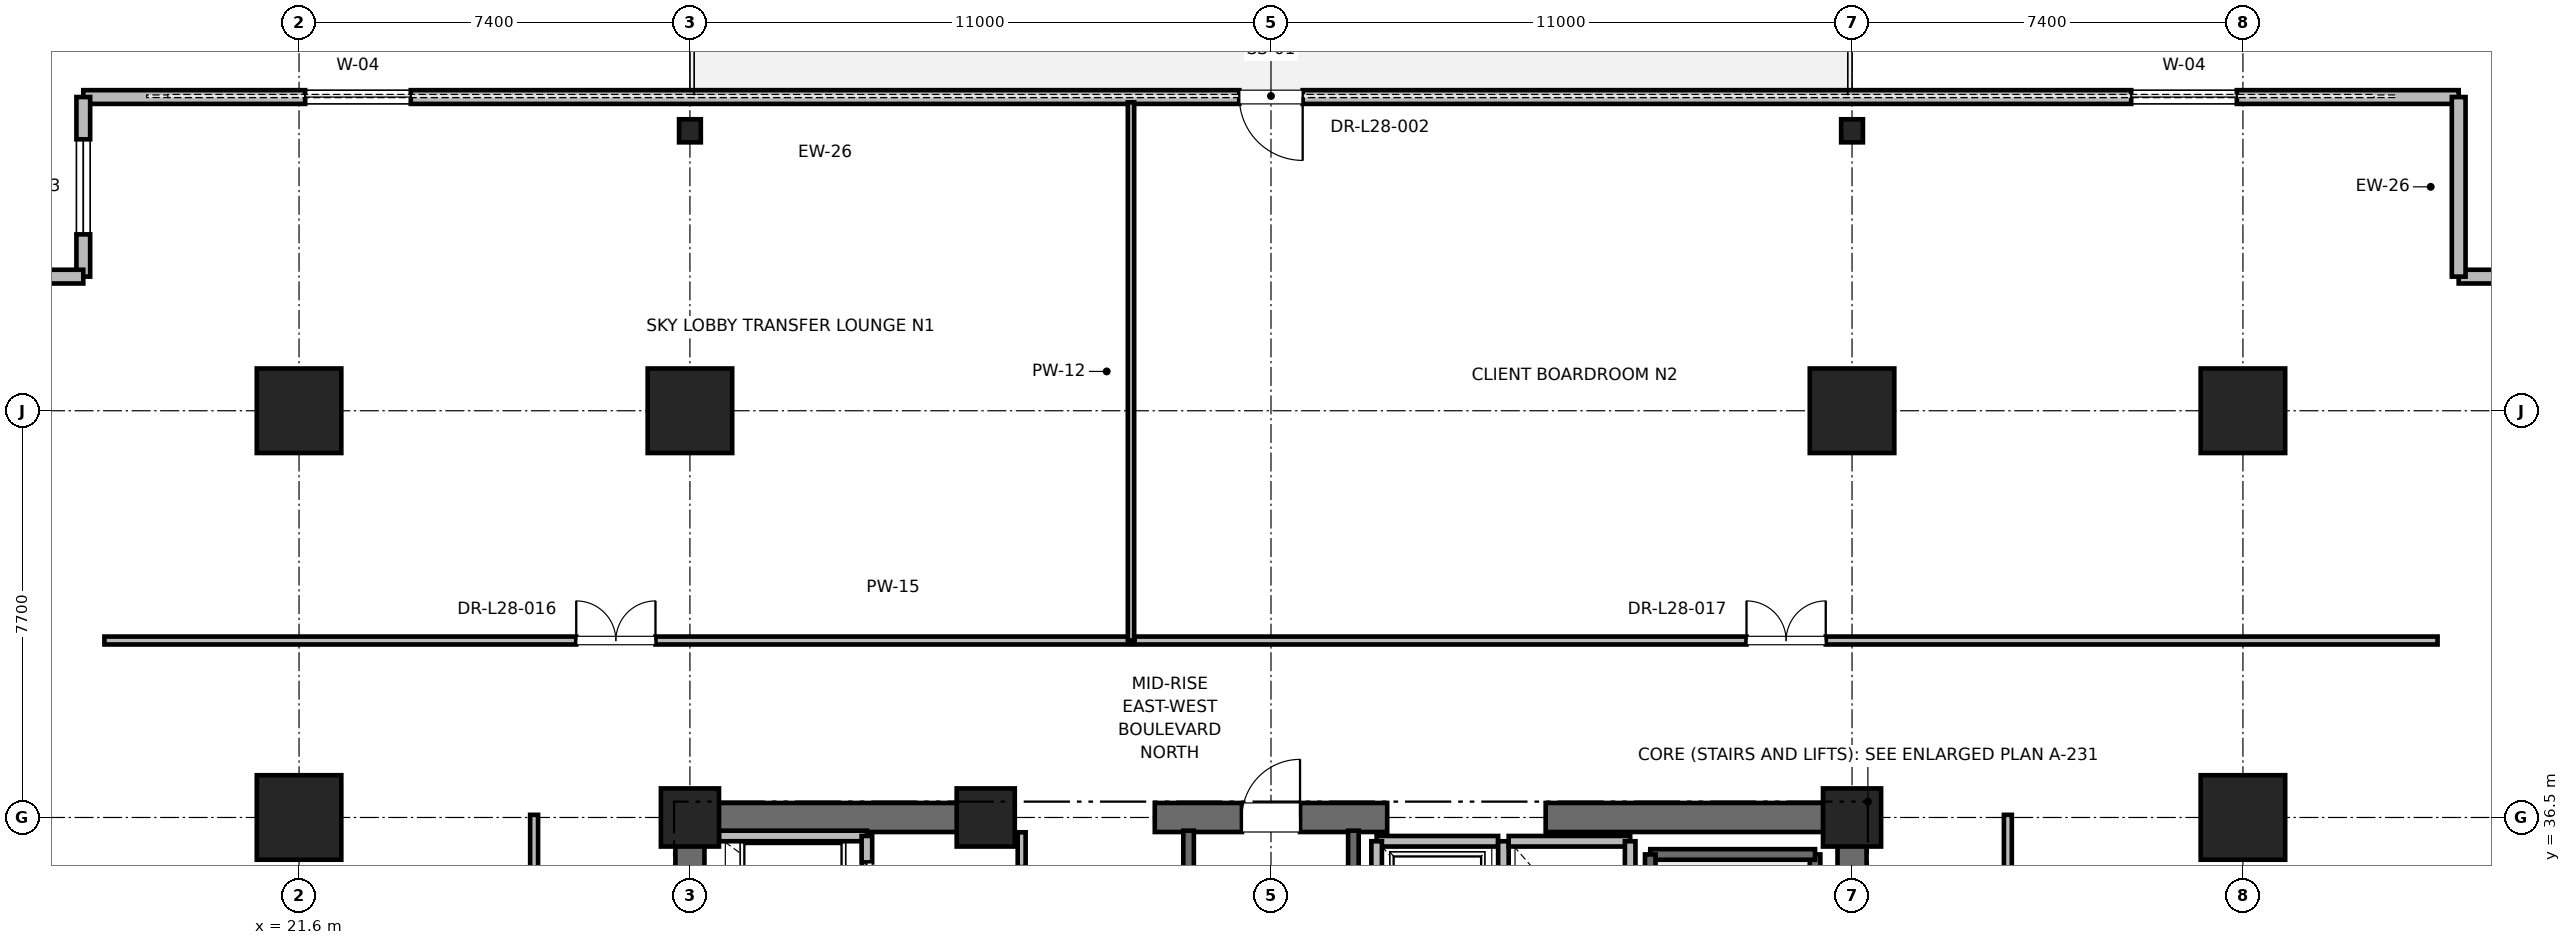
"""IFC4 building model, lengths in metres.
Left out: names, types, materials, properties, quantities, classifications, styles, units other than length and angle.
Written with IfcOpenShell. Run it as: python <this file> out.ifc"""

import sys

from ifc_helpers import new_model, si_unit, direction, frame, frame_2d, origin, origin_2d, place, context, subcontext, project, spatial, rectangle, i_section, extrude, element, fill, save


model = new_model("IFC4")
c1 = context("Model", 3, precision=1e-05, world=origin(), true_north=direction((0.0, 1.0)))
c2 = subcontext(c1, "Body", "Model", "MODEL_VIEW")
j1 = project(units=[si_unit("LENGTHUNIT", "METRE"), si_unit("PLANEANGLEUNIT", "RADIAN")], contexts=[c1])
p1 = place(None, origin())
s1 = spatial("IfcSite", under=j1, at=p1, CompositionType="ELEMENT")
p2 = place(p1, origin())
s2 = spatial("IfcBuilding", under=s1, at=p2, CompositionType="ELEMENT")
p3 = place(p2, frame((0.0, 0.0, 123.4)))
s3 = spatial("IfcBuildingStorey", under=s2, at=p3, CompositionType="ELEMENT", Elevation=123.4)
for number, where, z_axis, x_axis in (
    (1, (29.0, 44.2, 0.0), (0.0, 0.0, 1.0), (1.0, 0.0, 0.0)),
    (2, (51.0, 44.2, 0.0), (0.0, 0.0, 1.0), (1.0, 0.0, 0.0)),
    (3, (21.6, 36.5, 0.0), (0.0, 0.0, 1.0), (1.0, 0.0, 0.0)),
    (4, (58.4, 36.5, 0.0), (0.0, 0.0, 1.0), (1.0, 0.0, 0.0)),
    (5, (21.6, 44.2, 0.0), (0.0, 0.0, 1.0), (1.0, 0.0, 0.0)),
    (6, (58.4, 44.2, 0.0), (0.0, 0.0, 1.0), (1.0, 0.0, 0.0)),
):
    element("IfcColumn", number, at=place(p3, frame(where, z_axis=z_axis, x_axis=x_axis)), inside=s3, PredefinedType="COLUMN", context=c2, shape_type="SweptSolid", body=[
        extrude(rectangle(XDim=1.6, YDim=1.6, at=origin_2d()), origin(), (0.0, 0.0, 1.0), 5.0),
    ])
for number, where, z_axis, x_axis in (
    (7, (29.0, 49.5, 0.0), (0.0, 0.0, 1.0), (1.0, 0.0, 0.0)),
    (8, (51.0, 49.5, 0.0), (0.0, 0.0, 1.0), (1.0, 0.0, 0.0)),
):
    element("IfcColumn", number, at=place(p3, frame(where, z_axis=z_axis, x_axis=x_axis)), inside=s3, PredefinedType="COLUMN", context=c2, shape_type="SweptSolid", body=[
        extrude(i_section(OverallWidth=0.412, OverallDepth=0.437, WebThickness=0.036, FlangeThickness=0.058, FilletRadius=0.015, at=origin_2d()), origin(), (0.0, 0.0, 1.0), 5.0),
    ])
for number, where, z_axis, x_axis in (
    (9, (29.0, 36.5, 0.0), (0.0, 0.0, 1.0), (1.0, 0.0, 0.0)),
    (10, (51.0, 36.5, 0.0), (0.0, 0.0, 1.0), (1.0, 0.0, 0.0)),
    (11, (34.6, 36.5, 0.0), (0.0, 0.0, 1.0), (1.0, 0.0, 0.0)),
):
    element("IfcColumn", number, at=place(p3, frame(where, z_axis=z_axis, x_axis=x_axis)), inside=s3, PredefinedType="PILASTER", context=c2, shape_type="SweptSolid", body=[
        extrude(rectangle(XDim=1.1, YDim=1.1, at=origin_2d()), origin(), (0.0, 0.0, 1.0), 5.0),
    ])
p4 = place(p3, frame((29.0, 36.5, 0.0), z_axis=(0.0, 0.0, 1.0), x_axis=(1.0, 0.0, 0.0)))
e12 = element("IfcWall", 12, at=p4, inside=s3, PredefinedType="SHEAR", context=c2, shape_type="SweptSolid", body=[
    extrude(rectangle(XDim=5.8, YDim=0.55, at=frame_2d((2.9, 0.0))), origin(), (0.0, 0.0, 1.0), 4.775),
])
p5 = place(p3, frame((37.8, 36.5, 0.0), z_axis=(0.0, 0.0, 1.0), x_axis=(1.0, 0.0, 0.0)))
e13 = element("IfcWall", 13, at=p5, inside=s3, PredefinedType="SHEAR", context=c2, shape_type="SweptSolid", body=[
    extrude(rectangle(XDim=4.4, YDim=0.55, at=frame_2d((2.2, 0.0))), origin(), (0.0, 0.0, 1.0), 4.775),
])
p6 = place(p5, frame((1.65, 0.0, 0.0)))
e14 = element("IfcOpeningElement", 14, at=p6, cuts=e13, PredefinedType="OPENING", context=c2, shape_type="SweptSolid", body=[
    extrude(rectangle(XDim=1.1, YDim=2.15, at=frame_2d((0.55, 1.075))), frame((0.0, 0.275, 0.0), z_axis=(0.0, -1.0, 0.0), x_axis=(1.0, 0.0, 0.0)), (0.0, 0.0, 1.0), 0.55),
])
for number, where, z_axis, x_axis in (
    (15, (45.2, 36.5, 0.0), (0.0, 0.0, 1.0), (1.0, 0.0, 0.0)),
    (16, (29.0, 30.7, 0.0), (0.0, 0.0, 1.0), (0.0, 1.0, 0.0)),
):
    element("IfcWall", number, at=place(p3, frame(where, z_axis=z_axis, x_axis=x_axis)), inside=s3, PredefinedType="SHEAR", context=c2, shape_type="SweptSolid", body=[
        extrude(rectangle(XDim=5.8, YDim=0.55, at=frame_2d((2.9, 0.0))), origin(), (0.0, 0.0, 1.0), 4.775),
    ])
p7 = place(p3, frame((51.0, 27.7, 0.0), z_axis=(0.0, 0.0, 1.0), x_axis=(0.0, 1.0, 0.0)))
e17 = element("IfcWall", 17, at=p7, inside=s3, PredefinedType="SHEAR", context=c2, shape_type="SweptSolid", body=[
    extrude(rectangle(XDim=8.8, YDim=0.55, at=frame_2d((4.4, 0.0))), origin(), (0.0, 0.0, 1.0), 4.775),
])
p8 = place(p3, frame((62.485, 50.139, 0.0), z_axis=(0.0, 0.0, 1.0), x_axis=(-1.0, 0.0, 0.0)))
e18 = element("IfcWall", 18, at=p8, inside=s3, PredefinedType="PARAPET", context=c2, shape_type="SweptSolid", body=[
    extrude(rectangle(XDim=44.969, YDim=0.26, at=frame_2d((22.485, 0.0))), origin(), (0.0, 0.0, 1.0), 4.273),
])
p9 = place(p8, frame((4.2, 0.0, 0.85)))
e19 = element("IfcOpeningElement", 19, at=p9, cuts=e18, PredefinedType="OPENING", context=c2, shape_type="SweptSolid", body=[
    extrude(rectangle(XDim=2.0, YDim=2.3, at=frame_2d((1.0, 1.15))), frame((0.0, 0.13, 0.0), z_axis=(0.0, -1.0, 0.0), x_axis=(1.0, 0.0, 0.0)), (0.0, 0.0, 1.0), 0.26),
])
p10 = place(p8, frame((21.885, 0.0, 0.0)))
e20 = element("IfcOpeningElement", 20, at=p10, cuts=e18, PredefinedType="OPENING", context=c2, shape_type="SweptSolid", body=[
    extrude(rectangle(XDim=1.2, YDim=2.2, at=frame_2d((0.6, 1.1))), frame((0.0, 0.13, 0.0), z_axis=(0.0, -1.0, 0.0), x_axis=(1.0, 0.0, 0.0)), (0.0, 0.0, 1.0), 0.26),
])
p11 = place(p8, frame((38.769, 0.0, 0.85)))
e21 = element("IfcOpeningElement", 21, at=p11, cuts=e18, PredefinedType="OPENING", context=c2, shape_type="SweptSolid", body=[
    extrude(rectangle(XDim=2.0, YDim=2.3, at=frame_2d((1.0, 1.15))), frame((0.0, 0.13, 0.0), z_axis=(0.0, -1.0, 0.0), x_axis=(1.0, 0.0, 0.0)), (0.0, 0.0, 1.0), 0.26),
])
p12 = place(p3, frame((66.285, 46.739, 0.0), z_axis=(0.0, 0.0, 1.0), x_axis=(-1.0, 0.0, 0.0)))
e22 = element("IfcWall", 22, at=p12, inside=s3, PredefinedType="PARAPET", context=c2, shape_type="SweptSolid", body=[
    extrude(rectangle(XDim=3.8, YDim=0.26, at=frame_2d((1.9, 0.0))), origin(), (0.0, 0.0, 1.0), 4.775),
])
p13 = place(p12, frame((1.0, 0.0, 0.85)))
e23 = element("IfcOpeningElement", 23, at=p13, cuts=e22, PredefinedType="OPENING", context=c2, shape_type="SweptSolid", body=[
    extrude(rectangle(XDim=1.8, YDim=2.2, at=frame_2d((0.9, 1.1))), frame((0.0, 0.13, 0.0), z_axis=(0.0, -1.0, 0.0), x_axis=(1.0, 0.0, 0.0)), (0.0, 0.0, 1.0), 0.26),
])
p14 = place(p3, frame((62.485, 46.739, 0.0), z_axis=(0.0, 0.0, 1.0), x_axis=(0.0, 1.0, 0.0)))
e24 = element("IfcWall", 24, at=p14, inside=s3, PredefinedType="PARAPET", context=c2, shape_type="SweptSolid", body=[
    extrude(rectangle(XDim=3.4, YDim=0.26, at=frame_2d((1.7, 0.0))), origin(), (0.0, 0.0, 1.0), 4.775),
])
p15 = place(p3, frame((17.515, 50.139, 0.0), z_axis=(0.0, 0.0, 1.0), x_axis=(0.0, -1.0, 0.0)))
e25 = element("IfcWall", 25, at=p15, inside=s3, PredefinedType="PARAPET", context=c2, shape_type="SweptSolid", body=[
    extrude(rectangle(XDim=3.4, YDim=0.26, at=frame_2d((1.7, 0.0))), origin(), (0.0, 0.0, 1.0), 4.775),
])
p16 = place(p15, frame((0.8, 0.0, 0.85)))
e26 = element("IfcOpeningElement", 26, at=p16, cuts=e25, PredefinedType="OPENING", context=c2, shape_type="SweptSolid", body=[
    extrude(rectangle(XDim=1.8, YDim=2.2, at=frame_2d((0.9, 1.1))), frame((0.0, 0.13, 0.0), z_axis=(0.0, -1.0, 0.0), x_axis=(1.0, 0.0, 0.0)), (0.0, 0.0, 1.0), 0.26),
])
p17 = place(p3, frame((17.515, 46.739, 0.0), z_axis=(0.0, 0.0, 1.0), x_axis=(-1.0, 0.0, 0.0)))
e27 = element("IfcWall", 27, at=p17, inside=s3, PredefinedType="PARAPET", context=c2, shape_type="SweptSolid", body=[
    extrude(rectangle(XDim=3.8, YDim=0.26, at=frame_2d((1.9, 0.0))), origin(), (0.0, 0.0, 1.0), 4.775),
])
p18 = place(p3, frame((50.3, 27.65, 0.0), z_axis=(0.0, 0.0, 1.0), x_axis=(0.0, 1.0, 0.0)))
e28 = element("IfcWall", 28, at=p18, inside=s3, PredefinedType="SOLIDWALL", context=c2, shape_type="SweptSolid", body=[
    extrude(rectangle(XDim=8.15, YDim=0.2, at=frame_2d((4.075, 0.0))), origin(), (0.0, 0.0, 1.0), 4.775),
])
p19 = place(p3, frame((47.18, 35.8, 0.0), z_axis=(0.0, 0.0, 1.0), x_axis=(1.0, 0.0, 0.0)))
e29 = element("IfcWall", 29, at=p19, inside=s3, PredefinedType="SOLIDWALL", context=c2, shape_type="SweptSolid", body=[
    extrude(rectangle(XDim=3.12, YDim=0.2, at=frame_2d((1.56, 0.0))), origin(), (0.0, 0.0, 1.0), 4.775),
])
p20 = place(p3, frame((47.18, 27.62, 0.0), z_axis=(0.0, 0.0, 1.0), x_axis=(0.0, 1.0, 0.0)))
e30 = element("IfcWall", 30, at=p20, inside=s3, PredefinedType="SOLIDWALL", context=c2, shape_type="SweptSolid", body=[
    extrude(rectangle(XDim=8.18, YDim=0.2, at=frame_2d((4.09, 0.0))), origin(), (0.0, 0.0, 1.0), 4.775),
])
p21 = place(p3, frame((38.44, 27.38, 0.0), z_axis=(0.0, 0.0, 1.0), x_axis=(0.0, 1.0, 0.0)))
e31 = element("IfcWall", 31, at=p21, inside=s3, PredefinedType="SOLIDWALL", context=c2, shape_type="SweptSolid", body=[
    extrude(rectangle(XDim=8.87, YDim=0.2, at=frame_2d((4.435, 0.0))), origin(), (0.0, 0.0, 1.0), 4.775),
])
p22 = place(p3, frame((41.56, 27.68, 0.0), z_axis=(0.0, 0.0, 1.0), x_axis=(0.0, 1.0, 0.0)))
e32 = element("IfcWall", 32, at=p22, inside=s3, PredefinedType="SOLIDWALL", context=c2, shape_type="SweptSolid", body=[
    extrude(rectangle(XDim=8.57, YDim=0.2, at=frame_2d((4.285, 0.0))), origin(), (0.0, 0.0, 1.0), 4.775),
])
p23 = place(p3, frame((32.35, 36.15, 0.0), z_axis=(0.0, 0.0, 1.0), x_axis=(-1.0, 0.0, 0.0)))
e33 = element("IfcWall", 33, at=p23, inside=s3, PredefinedType="SOLIDWALL", context=c2, shape_type="SweptSolid", body=[
    extrude(rectangle(XDim=2.8, YDim=0.2, at=frame_2d((1.4, 0.0))), origin(), (0.0, 0.0, 1.0), 3.985),
])
p24 = place(p3, frame((32.35, 34.05, 0.0), z_axis=(0.0, 0.0, 1.0), x_axis=(0.0, 1.0, 0.0)))
e34 = element("IfcWall", 34, at=p24, inside=s3, PredefinedType="SOLIDWALL", context=c2, shape_type="SweptSolid", body=[
    extrude(rectangle(XDim=2.1, YDim=0.2, at=frame_2d((1.05, 0.0))), origin(), (0.0, 0.0, 1.0), 4.775),
])
p25 = place(p24, frame((0.5, 0.0, 0.0)))
e35 = element("IfcOpeningElement", 35, at=p25, cuts=e34, PredefinedType="OPENING", context=c2, shape_type="SweptSolid", body=[
    extrude(rectangle(XDim=1.1, YDim=2.2, at=frame_2d((0.55, 1.1))), frame((0.0, 0.1, 0.0), z_axis=(0.0, -1.0, 0.0), x_axis=(1.0, 0.0, 0.0)), (0.0, 0.0, 1.0), 0.2),
])
p26 = place(p3, frame((44.3, 36.05, 0.0), z_axis=(0.0, 0.0, 1.0), x_axis=(-1.0, 0.0, 0.0)))
e36 = element("IfcWall", 36, at=p26, inside=s3, PredefinedType="SOLIDWALL", context=c2, shape_type="SweptSolid", body=[
    extrude(rectangle(XDim=2.3, YDim=0.2, at=frame_2d((1.15, 0.0))), origin(), (0.0, 0.0, 1.0), 3.755),
])
for number, where, z_axis, x_axis in (
    (37, (42.0, 36.05, 0.0), (0.0, 0.0, 1.0), (0.0, -1.0, 0.0)),
    (38, (44.4, 33.45, 0.0), (0.0, 0.0, 1.0), (0.0, 1.0, 0.0)),
):
    element("IfcWall", number, at=place(p3, frame(where, z_axis=z_axis, x_axis=x_axis)), inside=s3, PredefinedType="SOLIDWALL", context=c2, shape_type="SweptSolid", body=[
        extrude(rectangle(XDim=2.6, YDim=0.2, at=frame_2d((1.3, 0.0))), origin(), (0.0, 0.0, 1.0), 3.755),
    ])
p27 = place(p3, frame((46.8, 36.05, 0.0), z_axis=(0.0, 0.0, 1.0), x_axis=(-1.0, 0.0, 0.0)))
e39 = element("IfcWall", 39, at=p27, inside=s3, PredefinedType="SOLIDWALL", context=c2, shape_type="SweptSolid", body=[
    extrude(rectangle(XDim=2.3, YDim=0.2, at=frame_2d((1.15, 0.0))), origin(), (0.0, 0.0, 1.0), 3.755),
])
p28 = place(p3, frame((46.8, 33.45, 0.0), z_axis=(0.0, 0.0, 1.0), x_axis=(0.0, 1.0, 0.0)))
e40 = element("IfcWall", 40, at=p28, inside=s3, PredefinedType="SOLIDWALL", context=c2, shape_type="SweptSolid", body=[
    extrude(rectangle(XDim=2.6, YDim=0.2, at=frame_2d((1.3, 0.0))), origin(), (0.0, 0.0, 1.0), 4.775),
])
p29 = place(p3, frame((35.28, 33.95, 0.0), z_axis=(0.0, 0.0, 1.0), x_axis=(0.0, 1.0, 0.0)))
e41 = element("IfcWall", 41, at=p29, inside=s3, PredefinedType="PARTITIONING", context=c2, shape_type="SweptSolid", body=[
    extrude(rectangle(XDim=2.27, YDim=0.15, at=frame_2d((1.135, 0.0))), origin(), (0.0, 0.0, 1.0), 2.85),
])
p30 = place(p29, frame((0.66, 0.0, 0.0)))
e42 = element("IfcOpeningElement", 42, at=p30, cuts=e41, PredefinedType="OPENING", context=c2, shape_type="SweptSolid", body=[
    extrude(rectangle(XDim=0.95, YDim=2.15, at=frame_2d((0.475, 1.075))), frame((0.0, 0.075, 0.0), z_axis=(0.0, -1.0, 0.0), x_axis=(1.0, 0.0, 0.0)), (0.0, 0.0, 1.0), 0.15),
])
p31 = place(p3, frame((17.915, 39.85, 0.0), z_axis=(0.0, 0.0, 1.0), x_axis=(1.0, 0.0, 0.0)))
e43 = element("IfcWall", 43, at=p31, inside=s3, PredefinedType="PARTITIONING", context=c2, shape_type="SweptSolid", body=[
    extrude(rectangle(XDim=19.435, YDim=0.15, at=frame_2d((9.717, 0.0))), origin(), (0.0, 0.0, 1.0), 2.85),
])
p32 = place(p31, frame((8.932, 0.0, 0.0)))
e44 = element("IfcOpeningElement", 44, at=p32, cuts=e43, PredefinedType="OPENING", context=c2, shape_type="SweptSolid", body=[
    extrude(rectangle(XDim=1.5, YDim=2.25, at=frame_2d((0.75, 1.125))), frame((0.0, 0.075, 0.0), z_axis=(0.0, -1.0, 0.0), x_axis=(1.0, 0.0, 0.0)), (0.0, 0.0, 1.0), 0.15),
])
p33 = place(p3, frame((37.35, 39.85, 0.0), z_axis=(0.0, 0.0, 1.0), x_axis=(0.0, 1.0, 0.0)))
e45 = element("IfcWall", 45, at=p33, inside=s3, PredefinedType="PARTITIONING", context=c2, shape_type="SweptSolid", body=[
    extrude(rectangle(XDim=10.189, YDim=0.12, at=frame_2d((5.095, 0.0))), origin(), (0.0, 0.0, 1.0), 2.85),
])
p34 = place(p3, frame((37.42, 39.85, 0.0), z_axis=(0.0, 0.0, 1.0), x_axis=(1.0, 0.0, 0.0)))
e46 = element("IfcWall", 46, at=p34, inside=s3, PredefinedType="PARTITIONING", context=c2, shape_type="SweptSolid", body=[
    extrude(rectangle(XDim=24.665, YDim=0.15, at=frame_2d((12.333, 0.0))), origin(), (0.0, 0.0, 1.0), 2.85),
])
p35 = place(p34, frame((11.583, 0.0, 0.0)))
e47 = element("IfcOpeningElement", 47, at=p35, cuts=e46, PredefinedType="OPENING", context=c2, shape_type="SweptSolid", body=[
    extrude(rectangle(XDim=1.5, YDim=2.25, at=frame_2d((0.75, 1.125))), frame((0.0, 0.075, 0.0), z_axis=(0.0, -1.0, 0.0), x_axis=(1.0, 0.0, 0.0)), (0.0, 0.0, 1.0), 0.15),
])
p36 = place(p3, frame((26.05, 26.122, 0.0), z_axis=(0.0, 0.0, 1.0), x_axis=(0.0, 1.0, 0.0)))
e48 = element("IfcWall", 48, at=p36, inside=s3, PredefinedType="PARTITIONING", context=c2, shape_type="SweptSolid", body=[
    extrude(rectangle(XDim=10.428, YDim=0.15, at=frame_2d((5.214, 0.0))), origin(), (0.0, 0.0, 1.0), 2.85),
])
p37 = place(p36, frame((4.639, 0.0, 0.0)))
e49 = element("IfcOpeningElement", 49, at=p37, cuts=e48, PredefinedType="OPENING", context=c2, shape_type="SweptSolid", body=[
    extrude(rectangle(XDim=1.0, YDim=2.15, at=frame_2d((0.5, 1.075))), frame((0.0, 0.075, 0.0), z_axis=(0.0, -1.0, 0.0), x_axis=(1.0, 0.0, 0.0)), (0.0, 0.0, 1.0), 0.15),
])
p38 = place(p3, frame((53.95, 18.45, 0.0), z_axis=(0.0, 0.0, 1.0), x_axis=(0.0, 1.0, 0.0)))
e50 = element("IfcWall", 50, at=p38, inside=s3, PredefinedType="PARTITIONING", context=c2, shape_type="SweptSolid", body=[
    extrude(rectangle(XDim=18.1, YDim=0.15, at=frame_2d((9.05, 0.0))), origin(), (0.0, 0.0, 1.0), 2.85),
])
p39 = place(p38, frame((8.55, 0.0, 0.0)))
e51 = element("IfcOpeningElement", 51, at=p39, cuts=e50, PredefinedType="OPENING", context=c2, shape_type="SweptSolid", body=[
    extrude(rectangle(XDim=1.0, YDim=2.15, at=frame_2d((0.5, 1.075))), frame((0.0, 0.075, 0.0), z_axis=(0.0, -1.0, 0.0), x_axis=(1.0, 0.0, 0.0)), (0.0, 0.0, 1.0), 0.15),
])
p40 = place(p9, origin())
e52 = element("IfcWindow", 52, at=p40, inside=s3, PartitioningType="SINGLE_PANEL", PredefinedType="WINDOW", context=c2, shape_type="SweptSolid", body=[
    extrude(rectangle(XDim=2.0, YDim=2.3, at=frame_2d((1.0, 1.15))), frame((0.0, 0.03, 0.0), z_axis=(0.0, -1.0, 0.0), x_axis=(1.0, 0.0, 0.0)), (0.0, 0.0, 1.0), 0.06),
])
fill(e19, e52)
p41 = place(p10, origin())
e53 = element("IfcDoor", 53, at=p41, inside=s3, OperationType="SINGLE_SWING_LEFT", PredefinedType="DOOR", context=c2, shape_type="SweptSolid", body=[
    extrude(rectangle(XDim=1.2, YDim=2.2, at=frame_2d((0.6, 1.1))), frame((0.0, 0.025, 0.0), z_axis=(0.0, -1.0, 0.0), x_axis=(1.0, 0.0, 0.0)), (0.0, 0.0, 1.0), 0.05),
])
fill(e20, e53)
p42 = place(p11, origin())
e54 = element("IfcWindow", 54, at=p42, inside=s3, PartitioningType="SINGLE_PANEL", PredefinedType="WINDOW", context=c2, shape_type="SweptSolid", body=[
    extrude(rectangle(XDim=2.0, YDim=2.3, at=frame_2d((1.0, 1.15))), frame((0.0, 0.03, 0.0), z_axis=(0.0, -1.0, 0.0), x_axis=(1.0, 0.0, 0.0)), (0.0, 0.0, 1.0), 0.06),
])
fill(e21, e54)
p43 = place(p16, origin())
e55 = element("IfcWindow", 55, at=p43, inside=s3, PartitioningType="SINGLE_PANEL", PredefinedType="WINDOW", context=c2, shape_type="SweptSolid", body=[
    extrude(rectangle(XDim=1.8, YDim=2.2, at=frame_2d((0.9, 1.1))), frame((0.0, 0.03, 0.0), z_axis=(0.0, -1.0, 0.0), x_axis=(1.0, 0.0, 0.0)), (0.0, 0.0, 1.0), 0.06),
])
fill(e26, e55)
p44 = place(p6, origin())
e56 = element("IfcDoor", 56, at=p44, inside=s3, OperationType="SINGLE_SWING_RIGHT", PredefinedType="DOOR", context=c2, shape_type="SweptSolid", body=[
    extrude(rectangle(XDim=1.1, YDim=2.15, at=frame_2d((0.55, 1.075))), frame((0.0, 0.025, 0.0), z_axis=(0.0, -1.0, 0.0), x_axis=(1.0, 0.0, 0.0)), (0.0, 0.0, 1.0), 0.05),
])
fill(e14, e56)
p45 = place(p25, origin())
e57 = element("IfcDoor", 57, at=p45, inside=s3, OperationType="SLIDING_TO_RIGHT", PredefinedType="DOOR", context=c2, shape_type="SweptSolid", body=[
    extrude(rectangle(XDim=1.1, YDim=2.2, at=frame_2d((0.55, 1.1))), frame((0.0, 0.025, 0.0), z_axis=(0.0, -1.0, 0.0), x_axis=(1.0, 0.0, 0.0)), (0.0, 0.0, 1.0), 0.05),
])
fill(e35, e57)
p46 = place(p32, origin())
e58 = element("IfcDoor", 58, at=p46, inside=s3, OperationType="DOUBLE_DOOR_SINGLE_SWING", PredefinedType="DOOR", context=c2, shape_type="SweptSolid", body=[
    extrude(rectangle(XDim=1.5, YDim=2.25, at=frame_2d((0.75, 1.125))), frame((0.0, 0.025, 0.0), z_axis=(0.0, -1.0, 0.0), x_axis=(1.0, 0.0, 0.0)), (0.0, 0.0, 1.0), 0.05),
])
fill(e44, e58)
p47 = place(p35, origin())
e59 = element("IfcDoor", 59, at=p47, inside=s3, OperationType="DOUBLE_DOOR_SINGLE_SWING", PredefinedType="DOOR", context=c2, shape_type="SweptSolid", body=[
    extrude(rectangle(XDim=1.5, YDim=2.25, at=frame_2d((0.75, 1.125))), frame((0.0, 0.025, 0.0), z_axis=(0.0, -1.0, 0.0), x_axis=(1.0, 0.0, 0.0)), (0.0, 0.0, 1.0), 0.05),
])
fill(e47, e59)
save(model, sys.argv[1])
